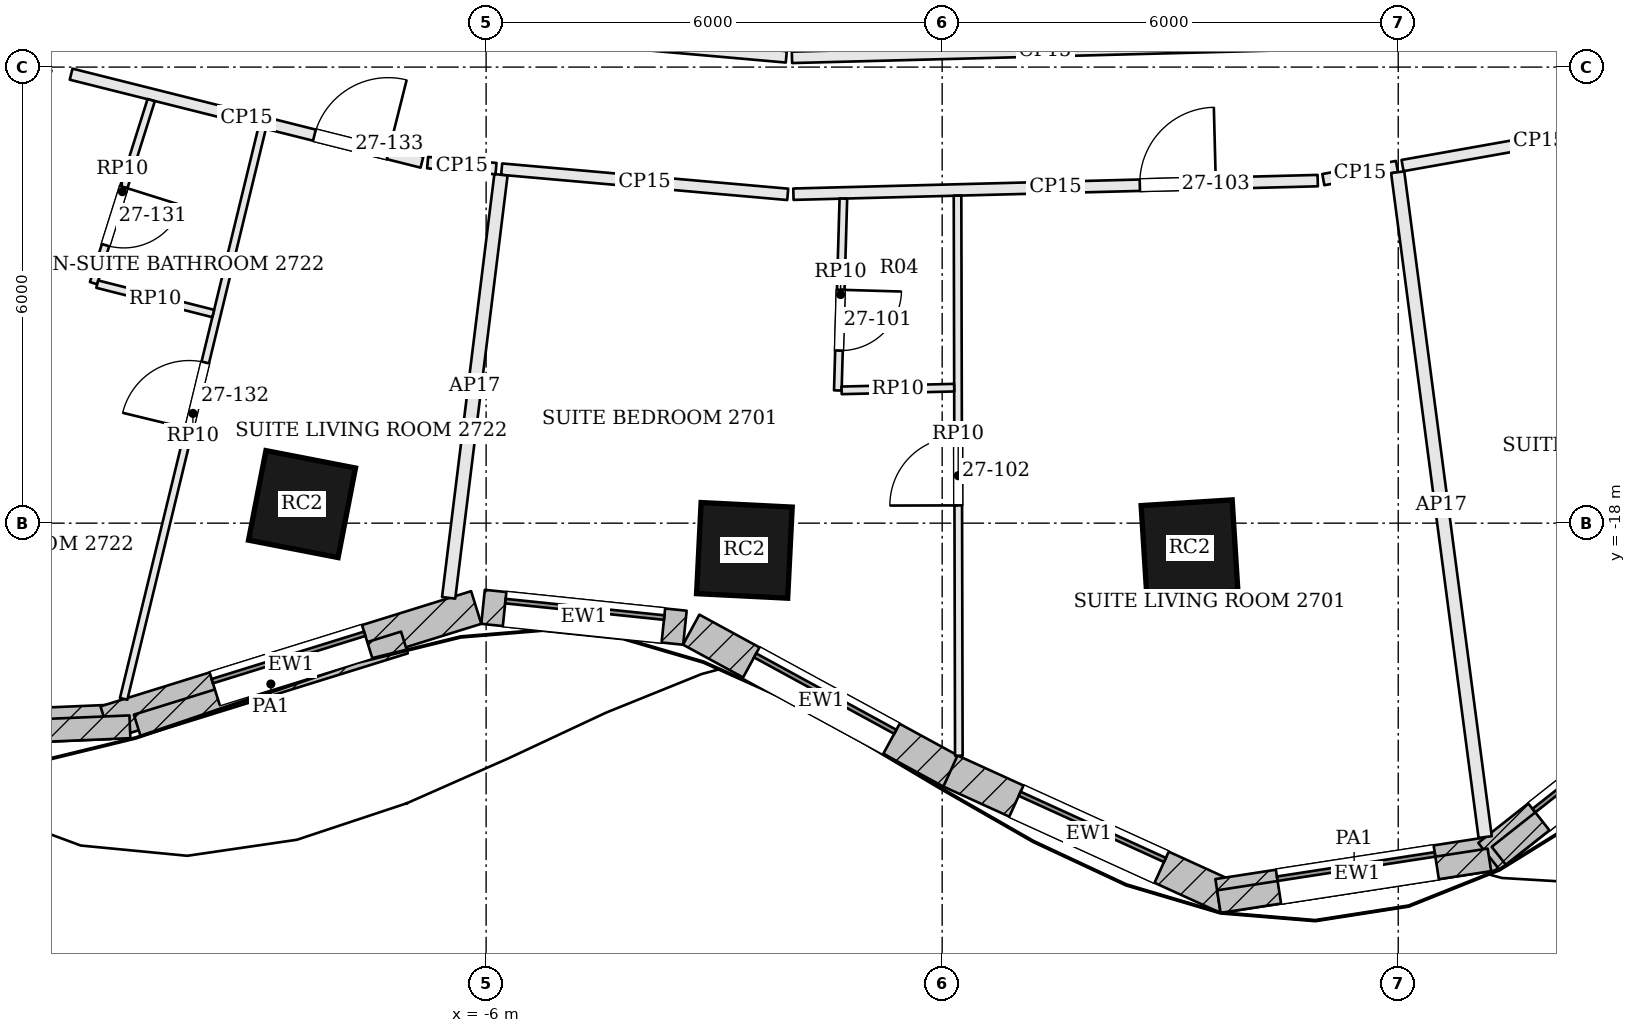
"""IFC4 building model, lengths in metres.
Left out: names, types, materials, properties, quantities, classifications, styles, units other than length and angle.
Written with IfcOpenShell. Run it as: python <this file> out.ifc"""

import sys

from ifc_helpers import new_model, si_unit, direction, frame, frame_2d, origin, origin_2d, place, context, subcontext, project, spatial, rectangle, extrude, element, fill, save


model = new_model("IFC4")
c1 = context("Model", 3, precision=1e-05, world=origin(), true_north=direction((0.0, 1.0)))
c2 = subcontext(c1, "Body", "Model", "MODEL_VIEW")
j1 = project(units=[si_unit("LENGTHUNIT", "METRE"), si_unit("PLANEANGLEUNIT", "RADIAN")], contexts=[c1])
p1 = place(None, origin())
s1 = spatial("IfcSite", under=j1, at=p1, CompositionType="ELEMENT")
p2 = place(p1, origin())
s2 = spatial("IfcBuilding", under=s1, at=p2, CompositionType="ELEMENT")
p3 = place(p2, frame((0.0, 0.0, 114.0)))
s3 = spatial("IfcBuildingStorey", under=s2, at=p3, CompositionType="ELEMENT", Elevation=114.0)
for number, where, z_axis, x_axis in (
    (1, (-8.422, -17.749, 0.0), (0.0, 0.0, 1.0), (0.982, -0.191, 0.0)),
    (2, (-2.602, -18.358, 0.0), (0.0, 0.0, 1.0), (0.999, -0.05, 0.0)),
    (3, (3.254, -18.33, 0.0), (0.0, 0.0, 1.0), (0.998, 0.063, 0.0)),
):
    element("IfcColumn", number, at=place(p3, frame(where, z_axis=z_axis, x_axis=x_axis)), inside=s3, PredefinedType="COLUMN", context=c2, shape_type="SweptSolid", body=[
        extrude(rectangle(XDim=1.2, YDim=1.2, at=origin_2d()), origin(), (0.0, 0.0, 1.0), 3.6),
    ])
p4 = place(p3, frame((-15.283, -20.798, 0.0), z_axis=(0.0, 0.0, 1.0), x_axis=(0.999108814386, 0.042208731526, 0.0)))
e4 = element("IfcWall", 4, at=p4, inside=s3, PredefinedType="SOLIDWALL", context=c2, shape_type="SweptSolid", body=[
    extrude(rectangle(XDim=4.338, YDim=0.45, at=frame_2d((2.169, 0.0))), origin(), (0.0, 0.0, 1.0), 3.4),
])
p5 = place(p4, frame((1.119, 0.0, 0.9)))
e5 = element("IfcOpeningElement", 5, at=p5, cuts=e4, PredefinedType="OPENING", context=c2, shape_type="SweptSolid", body=[
    extrude(rectangle(XDim=2.1, YDim=2.0, at=frame_2d((1.05, 1.0))), frame((0.0, 0.235, 0.0), z_axis=(0.0, -1.0, 0.0), x_axis=(1.0, 0.0, 0.0)), (0.0, 0.0, 1.0), 0.47),
])
p6 = place(p3, frame((-11.007, -20.625, 0.0), z_axis=(0.0, 0.0, 1.0), x_axis=(0.954949254112, 0.296769139352, 0.0)))
e6 = element("IfcWall", 6, at=p6, inside=s3, PredefinedType="SOLIDWALL", context=c2, shape_type="SweptSolid", body=[
    extrude(rectangle(XDim=5.106, YDim=0.45, at=frame_2d((2.553, 0.0))), origin(), (0.0, 0.0, 1.0), 3.4),
])
p7 = place(p6, frame((1.503, 0.0, 0.9)))
e7 = element("IfcOpeningElement", 7, at=p7, cuts=e6, PredefinedType="OPENING", context=c2, shape_type="SweptSolid", body=[
    extrude(rectangle(XDim=2.1, YDim=2.0, at=frame_2d((1.05, 1.0))), frame((0.0, 0.235, 0.0), z_axis=(0.0, -1.0, 0.0), x_axis=(1.0, 0.0, 0.0)), (0.0, 0.0, 1.0), 0.47),
])
p8 = place(p3, frame((-6.04, -19.101, 0.0), z_axis=(0.0, 0.0, 1.0), x_axis=(0.994675968472, -0.103052014752, 0.0)))
e8 = element("IfcWall", 8, at=p8, inside=s3, PredefinedType="SOLIDWALL", context=c2, shape_type="SweptSolid", body=[
    extrude(rectangle(XDim=2.67, YDim=0.45, at=frame_2d((1.335, 0.0))), origin(), (0.0, 0.0, 1.0), 3.4),
])
p9 = place(p8, frame((0.285, 0.0, 0.9)))
e9 = element("IfcOpeningElement", 9, at=p9, cuts=e8, PredefinedType="OPENING", context=c2, shape_type="SweptSolid", body=[
    extrude(rectangle(XDim=2.1, YDim=2.0, at=frame_2d((1.05, 1.0))), frame((0.0, 0.235, 0.0), z_axis=(0.0, -1.0, 0.0), x_axis=(1.0, 0.0, 0.0)), (0.0, 0.0, 1.0), 0.47),
])
p10 = place(p3, frame((-3.302, -19.401, 0.0), z_axis=(0.0, 0.0, 1.0), x_axis=(0.878060540763, -0.47854956562, 0.0)))
e10 = element("IfcWall", 10, at=p10, inside=s3, PredefinedType="SOLIDWALL", context=c2, shape_type="SweptSolid", body=[
    extrude(rectangle(XDim=3.901, YDim=0.45, at=frame_2d((1.951, 0.0))), origin(), (0.0, 0.0, 1.0), 3.4),
])
p11 = place(p10, frame((0.901, 0.0, 0.9)))
e11 = element("IfcOpeningElement", 11, at=p11, cuts=e10, PredefinedType="OPENING", context=c2, shape_type="SweptSolid", body=[
    extrude(rectangle(XDim=2.1, YDim=2.0, at=frame_2d((1.05, 1.0))), frame((0.0, 0.235, 0.0), z_axis=(0.0, -1.0, 0.0), x_axis=(1.0, 0.0, 0.0)), (0.0, 0.0, 1.0), 0.47),
])
p12 = place(p3, frame((0.109, -21.261, 0.0), z_axis=(0.0, 0.0, 1.0), x_axis=(0.910040573706, -0.414519184367, 0.0)))
e12 = element("IfcWall", 12, at=p12, inside=s3, PredefinedType="SOLIDWALL", context=c2, shape_type="SweptSolid", body=[
    extrude(rectangle(XDim=4.006, YDim=0.45, at=frame_2d((2.003, 0.0))), origin(), (0.0, 0.0, 1.0), 3.4),
])
p13 = place(p12, frame((0.953, 0.0, 0.9)))
e13 = element("IfcOpeningElement", 13, at=p13, cuts=e12, PredefinedType="OPENING", context=c2, shape_type="SweptSolid", body=[
    extrude(rectangle(XDim=2.1, YDim=2.0, at=frame_2d((1.05, 1.0))), frame((0.0, 0.235, 0.0), z_axis=(0.0, -1.0, 0.0), x_axis=(1.0, 0.0, 0.0)), (0.0, 0.0, 1.0), 0.47),
])
p14 = place(p3, frame((3.629, -22.905, 0.0), z_axis=(0.0, 0.0, 1.0), x_axis=(0.988300084321, 0.152521943772, 0.0)))
e14 = element("IfcWall", 14, at=p14, inside=s3, PredefinedType="SOLIDWALL", context=c2, shape_type="SweptSolid", body=[
    extrude(rectangle(XDim=3.71, YDim=0.45, at=frame_2d((1.855, 0.0))), origin(), (0.0, 0.0, 1.0), 3.4),
])
p15 = place(p14, frame((0.805, 0.0, 0.9)))
e15 = element("IfcOpeningElement", 15, at=p15, cuts=e14, PredefinedType="OPENING", context=c2, shape_type="SweptSolid", body=[
    extrude(rectangle(XDim=2.1, YDim=2.0, at=frame_2d((1.05, 1.0))), frame((0.0, 0.235, 0.0), z_axis=(0.0, -1.0, 0.0), x_axis=(1.0, 0.0, 0.0)), (0.0, 0.0, 1.0), 0.47),
])
p16 = place(p3, frame((7.193, -22.383, 0.0), z_axis=(0.0, 0.0, 1.0), x_axis=(0.784803291184, 0.619744942816, 0.0)))
e16 = element("IfcWall", 16, at=p16, inside=s3, PredefinedType="SOLIDWALL", context=c2, shape_type="SweptSolid", body=[
    extrude(rectangle(XDim=3.775, YDim=0.45, at=frame_2d((1.887, 0.0))), origin(), (0.0, 0.0, 1.0), 3.4),
])
p17 = place(p16, frame((0.837, 0.0, 0.9)))
e17 = element("IfcOpeningElement", 17, at=p17, cuts=e16, PredefinedType="OPENING", context=c2, shape_type="SweptSolid", body=[
    extrude(rectangle(XDim=2.1, YDim=2.0, at=frame_2d((1.05, 1.0))), frame((0.0, 0.235, 0.0), z_axis=(0.0, -1.0, 0.0), x_axis=(1.0, 0.0, 0.0)), (0.0, 0.0, 1.0), 0.47),
])
p18 = place(p3, frame((-15.133, -20.867, 3.6), z_axis=(0.0, 0.0, 1.0), x_axis=(0.999109914186, 0.042182690458, 0.0)))
e18 = element("IfcWall", 18, at=p18, inside=s3, PredefinedType="PARAPET", context=c2, shape_type="SweptSolid", body=[
    extrude(rectangle(XDim=4.451, YDim=0.3, at=frame_2d((2.225, 0.0))), origin(), (0.0, 0.0, 1.0), 1.1),
])
p19 = place(p3, frame((-10.59, -20.662, 3.6), z_axis=(0.0, 0.0, 1.0), x_axis=(0.954933257017, 0.296820610207, 0.0)))
e19 = element("IfcWall", 19, at=p19, inside=s3, PredefinedType="PARAPET", context=c2, shape_type="SweptSolid", body=[
    extrude(rectangle(XDim=3.681, YDim=0.3, at=frame_2d((1.84, 0.0))), origin(), (0.0, 0.0, 1.0), 1.1),
])
p20 = place(p3, frame((3.64, -22.979, 3.6), z_axis=(0.0, 0.0, 1.0), x_axis=(0.988299486994, 0.152525814235, 0.0)))
e20 = element("IfcWall", 20, at=p20, inside=s3, PredefinedType="PARAPET", context=c2, shape_type="SweptSolid", body=[
    extrude(rectangle(XDim=3.602, YDim=0.3, at=frame_2d((1.801, 0.0))), origin(), (0.0, 0.0, 1.0), 1.1),
])
p21 = place(p3, frame((7.323, -22.376, 3.6), z_axis=(0.0, 0.0, 1.0), x_axis=(0.784819122577, 0.61972489448, 0.0)))
e21 = element("IfcWall", 21, at=p21, inside=s3, PredefinedType="PARAPET", context=c2, shape_type="SweptSolid", body=[
    extrude(rectangle(XDim=3.633, YDim=0.3, at=frame_2d((1.817, 0.0))), origin(), (0.0, 0.0, 1.0), 1.1),
])
p22 = place(p3, frame((-5.795, -13.343, 0.0), z_axis=(0.0, 0.0, 1.0), x_axis=(0.996141988263, -0.087756134937, 0.0)))
e22 = element("IfcWall", 22, at=p22, inside=s3, PredefinedType="PARTITIONING", context=c2, shape_type="SweptSolid", body=[
    extrude(rectangle(XDim=3.778, YDim=0.15, at=frame_2d((1.889, 0.0))), origin(), (0.0, 0.0, 1.0), 2.784),
])
p23 = place(p3, frame((-1.957, -13.672, 0.0), z_axis=(0.0, 0.0, 1.0), x_axis=(0.99966456087, 0.025899145557, 0.0)))
e23 = element("IfcWall", 23, at=p23, inside=s3, PredefinedType="PARTITIONING", context=c2, shape_type="SweptSolid", body=[
    extrude(rectangle(XDim=6.9, YDim=0.15, at=frame_2d((3.45, 0.0))), origin(), (0.0, 0.0, 1.0), 2.784),
])
p24 = place(p23, frame((4.559, 0.0, 0.0)))
e24 = element("IfcOpeningElement", 24, at=p24, cuts=e23, PredefinedType="OPENING", context=c2, shape_type="SweptSolid", body=[
    extrude(rectangle(XDim=1.0, YDim=2.1, at=frame_2d((0.5, 1.05))), frame((0.0, 0.085, 0.0), z_axis=(0.0, -1.0, 0.0), x_axis=(1.0, 0.0, 0.0)), (0.0, 0.0, 1.0), 0.17),
])
p25 = place(p3, frame((5.015, -13.48, 0.0), z_axis=(0.0, 0.0, 1.0), x_axis=(0.984650804906, 0.174535934405, 0.0)))
e25 = element("IfcWall", 25, at=p25, inside=s3, PredefinedType="PARTITIONING", context=c2, shape_type="SweptSolid", body=[
    extrude(rectangle(XDim=0.983, YDim=0.15, at=frame_2d((0.492, 0.0))), origin(), (0.0, 0.0, 1.0), 2.784),
])
p26 = place(p3, frame((-6.493, -18.982, 0.0), z_axis=(0.0, 0.0, 1.0), x_axis=(0.122812974154, 0.992429832975, 0.0)))
e26 = element("IfcWall", 26, at=p26, inside=s3, PredefinedType="PARTITIONING", context=c2, shape_type="SweptSolid", body=[
    extrude(rectangle(XDim=5.608, YDim=0.175, at=frame_2d((2.804, 0.0))), origin(), (0.0, 0.0, 1.0), 2.784),
])
p27 = place(p3, frame((7.144, -22.13, 0.0), z_axis=(0.0, 0.0, 1.0), x_axis=(-0.13045236501, 0.991454578114, 0.0)))
e27 = element("IfcWall", 27, at=p27, inside=s3, PredefinedType="PARTITIONING", context=c2, shape_type="SweptSolid", body=[
    extrude(rectangle(XDim=8.822, YDim=0.175, at=frame_2d((4.411, 0.0))), origin(), (0.0, 0.0, 1.0), 2.784),
])
p28 = place(p3, frame((6.057, -13.295, 0.0), z_axis=(0.0, 0.0, 1.0), x_axis=(0.984639377301, 0.174600391377, 0.0)))
e28 = element("IfcWall", 28, at=p28, inside=s3, PredefinedType="PARTITIONING", context=c2, shape_type="SweptSolid", body=[
    extrude(rectangle(XDim=3.656, YDim=0.15, at=frame_2d((1.828, 0.0))), origin(), (0.0, 0.0, 1.0), 2.784),
])
p29 = place(p3, frame((-11.46, -12.093, 0.0), z_axis=(0.0, 0.0, 1.0), x_axis=(0.969988379079, -0.243151278945, 0.0)))
e29 = element("IfcWall", 29, at=p29, inside=s3, PredefinedType="PARTITIONING", context=c2, shape_type="SweptSolid", body=[
    extrude(rectangle(XDim=4.758, YDim=0.15, at=frame_2d((2.379, 0.0))), origin(), (0.0, 0.0, 1.0), 2.784),
])
p30 = place(p29, frame((3.3, 0.0, 0.0)))
e30 = element("IfcOpeningElement", 30, at=p30, cuts=e29, PredefinedType="OPENING", context=c2, shape_type="SweptSolid", body=[
    extrude(rectangle(XDim=1.0, YDim=2.1, at=frame_2d((0.5, 1.05))), frame((0.0, 0.085, 0.0), z_axis=(0.0, -1.0, 0.0), x_axis=(1.0, 0.0, 0.0)), (0.0, 0.0, 1.0), 0.17),
])
p31 = place(p3, frame((-6.77, -13.257, 0.0), z_axis=(0.0, 0.0, 1.0), x_axis=(0.996131242487, -0.087878027635, 0.0)))
e31 = element("IfcWall", 31, at=p31, inside=s3, PredefinedType="PARTITIONING", context=c2, shape_type="SweptSolid", body=[
    extrude(rectangle(XDim=0.903, YDim=0.15, at=frame_2d((0.451, 0.0))), origin(), (0.0, 0.0, 1.0), 2.784),
])
p32 = place(p3, frame((4.684, -11.699, 0.0), z_axis=(0.0, 0.0, 1.0), x_axis=(-0.999663438204, -0.025942442425, 0.0)))
e32 = element("IfcWall", 32, at=p32, inside=s3, PredefinedType="PARTITIONING", context=c2, shape_type="SweptSolid", body=[
    extrude(rectangle(XDim=6.663, YDim=0.15, at=frame_2d((3.332, 0.0))), origin(), (0.0, 0.0, 1.0), 2.784),
])
p33 = place(p3, frame((-2.051, -11.865, 0.0), z_axis=(0.0, 0.0, 1.0), x_axis=(-0.996139599493, 0.087783246245, 0.0)))
e33 = element("IfcWall", 33, at=p33, inside=s3, PredefinedType="PARTITIONING", context=c2, shape_type="SweptSolid", body=[
    extrude(rectangle(XDim=4.511, YDim=0.15, at=frame_2d((2.255, 0.0))), origin(), (0.0, 0.0, 1.0), 2.784),
])
p34 = place(p3, frame((0.219, -21.059, 0.0), z_axis=(0.0, 0.0, 1.0), x_axis=(-0.002352544848, 0.999997232763, 0.0)))
e34 = element("IfcWall", 34, at=p34, inside=s3, PredefinedType="PARTITIONING", context=c2, shape_type="SweptSolid", body=[
    extrude(rectangle(XDim=7.368, YDim=0.1, at=frame_2d((3.684, 0.0))), origin(), (0.0, 0.0, 1.0), 2.884),
])
p35 = place(p34, frame((3.293, 0.0, 0.0)))
e35 = element("IfcOpeningElement", 35, at=p35, cuts=e34, PredefinedType="OPENING", context=c2, shape_type="SweptSolid", body=[
    extrude(rectangle(XDim=0.9, YDim=2.4, at=frame_2d((0.45, 1.2))), frame((0.0, 0.06, 0.0), z_axis=(0.0, -1.0, 0.0), x_axis=(1.0, 0.0, 0.0)), (0.0, 0.0, 1.0), 0.12),
])
p36 = place(p3, frame((-1.3, -13.73, 0.0), z_axis=(0.0, 0.0, 1.0), x_axis=(-0.028910332819, -0.99958200897, 0.0)))
e36 = element("IfcWall", 36, at=p36, inside=s3, PredefinedType="PARTITIONING", context=c2, shape_type="SweptSolid", body=[
    extrude(rectangle(XDim=2.525, YDim=0.1, at=frame_2d((1.262, 0.0))), origin(), (0.0, 0.0, 1.0), 2.884),
])
p37 = place(p36, frame((1.2, 0.0, 0.0)))
e37 = element("IfcOpeningElement", 37, at=p37, cuts=e36, PredefinedType="OPENING", context=c2, shape_type="SweptSolid", body=[
    extrude(rectangle(XDim=0.8, YDim=2.1, at=frame_2d((0.4, 1.05))), frame((0.0, 0.06, 0.0), z_axis=(0.0, -1.0, 0.0), x_axis=(1.0, 0.0, 0.0)), (0.0, 0.0, 1.0), 0.12),
])
p38 = place(p3, frame((-1.323, -16.253, 0.0), z_axis=(0.0, 0.0, 1.0), x_axis=(0.999714428323, 0.023896899457, 0.0)))
e38 = element("IfcWall", 38, at=p38, inside=s3, PredefinedType="PARTITIONING", context=c2, shape_type="SweptSolid", body=[
    extrude(rectangle(XDim=1.481, YDim=0.1, at=frame_2d((0.741, 0.0))), origin(), (0.0, 0.0, 1.0), 2.884),
])
p39 = place(p3, frame((-10.769, -20.311, 0.0), z_axis=(0.0, 0.0, 1.0), x_axis=(0.235780843646, 0.971806253206, 0.0)))
e39 = element("IfcWall", 39, at=p39, inside=s3, PredefinedType="PARTITIONING", context=c2, shape_type="SweptSolid", body=[
    extrude(rectangle(XDim=7.729, YDim=0.1, at=frame_2d((3.864, 0.0))), origin(), (0.0, 0.0, 1.0), 2.884),
])
p40 = place(p39, frame((3.654, 0.0, 0.0)))
e40 = element("IfcOpeningElement", 40, at=p40, cuts=e39, PredefinedType="OPENING", context=c2, shape_type="SweptSolid", body=[
    extrude(rectangle(XDim=0.9, YDim=2.4, at=frame_2d((0.45, 1.2))), frame((0.0, 0.06, 0.0), z_axis=(0.0, -1.0, 0.0), x_axis=(1.0, 0.0, 0.0)), (0.0, 0.0, 1.0), 0.12),
])
p41 = place(p3, frame((-10.406, -12.434, 0.0), z_axis=(0.0, 0.0, 1.0), x_axis=(-0.300404792704, -0.95381180561, 0.0)))
e41 = element("IfcWall", 41, at=p41, inside=s3, PredefinedType="PARTITIONING", context=c2, shape_type="SweptSolid", body=[
    extrude(rectangle(XDim=2.525, YDim=0.1, at=frame_2d((1.263, 0.0))), origin(), (0.0, 0.0, 1.0), 2.884),
])
p42 = place(p41, frame((1.2, 0.0, 0.0)))
e42 = element("IfcOpeningElement", 42, at=p42, cuts=e41, PredefinedType="OPENING", context=c2, shape_type="SweptSolid", body=[
    extrude(rectangle(XDim=0.8, YDim=2.1, at=frame_2d((0.4, 1.05))), frame((0.0, 0.06, 0.0), z_axis=(0.0, -1.0, 0.0), x_axis=(1.0, 0.0, 0.0)), (0.0, 0.0, 1.0), 0.12),
])
p43 = place(p3, frame((-11.116, -14.855, 0.0), z_axis=(0.0, 0.0, 1.0), x_axis=(0.969315873367, -0.245818505486, 0.0)))
e43 = element("IfcWall", 43, at=p43, inside=s3, PredefinedType="PARTITIONING", context=c2, shape_type="SweptSolid", body=[
    extrude(rectangle(XDim=1.574, YDim=0.1, at=frame_2d((0.787, 0.0))), origin(), (0.0, 0.0, 1.0), 2.884),
])
p44 = place(p7, origin())
e44 = element("IfcWindow", 44, at=p44, inside=s3, PartitioningType="SINGLE_PANEL", PredefinedType="WINDOW", context=c2, shape_type="SweptSolid", body=[
    extrude(rectangle(XDim=2.1, YDim=2.0, at=frame_2d((1.05, 1.0))), frame((0.0, 0.135, 0.0), z_axis=(0.0, -1.0, 0.0), x_axis=(1.0, 0.0, 0.0)), (0.0, 0.0, 1.0), 0.06),
])
fill(e7, e44)
p45 = place(p9, origin())
e45 = element("IfcWindow", 45, at=p45, inside=s3, PartitioningType="SINGLE_PANEL", PredefinedType="WINDOW", context=c2, shape_type="SweptSolid", body=[
    extrude(rectangle(XDim=2.1, YDim=2.0, at=frame_2d((1.05, 1.0))), frame((0.0, 0.135, 0.0), z_axis=(0.0, -1.0, 0.0), x_axis=(1.0, 0.0, 0.0)), (0.0, 0.0, 1.0), 0.06),
])
fill(e9, e45)
p46 = place(p11, origin())
e46 = element("IfcWindow", 46, at=p46, inside=s3, PartitioningType="SINGLE_PANEL", PredefinedType="WINDOW", context=c2, shape_type="SweptSolid", body=[
    extrude(rectangle(XDim=2.1, YDim=2.0, at=frame_2d((1.05, 1.0))), frame((0.0, 0.135, 0.0), z_axis=(0.0, -1.0, 0.0), x_axis=(1.0, 0.0, 0.0)), (0.0, 0.0, 1.0), 0.06),
])
fill(e11, e46)
p47 = place(p13, origin())
e47 = element("IfcWindow", 47, at=p47, inside=s3, PartitioningType="SINGLE_PANEL", PredefinedType="WINDOW", context=c2, shape_type="SweptSolid", body=[
    extrude(rectangle(XDim=2.1, YDim=2.0, at=frame_2d((1.05, 1.0))), frame((0.0, 0.135, 0.0), z_axis=(0.0, -1.0, 0.0), x_axis=(1.0, 0.0, 0.0)), (0.0, 0.0, 1.0), 0.06),
])
fill(e13, e47)
p48 = place(p15, origin())
e48 = element("IfcWindow", 48, at=p48, inside=s3, PartitioningType="SINGLE_PANEL", PredefinedType="WINDOW", context=c2, shape_type="SweptSolid", body=[
    extrude(rectangle(XDim=2.1, YDim=2.0, at=frame_2d((1.05, 1.0))), frame((0.0, 0.135, 0.0), z_axis=(0.0, -1.0, 0.0), x_axis=(1.0, 0.0, 0.0)), (0.0, 0.0, 1.0), 0.06),
])
fill(e15, e48)
p49 = place(p17, origin())
e49 = element("IfcWindow", 49, at=p49, inside=s3, PartitioningType="SINGLE_PANEL", PredefinedType="WINDOW", context=c2, shape_type="SweptSolid", body=[
    extrude(rectangle(XDim=2.1, YDim=2.0, at=frame_2d((1.05, 1.0))), frame((0.0, 0.135, 0.0), z_axis=(0.0, -1.0, 0.0), x_axis=(1.0, 0.0, 0.0)), (0.0, 0.0, 1.0), 0.06),
])
fill(e17, e49)
p50 = place(p37, origin())
e50 = element("IfcDoor", 50, at=p50, inside=s3, OperationType="SINGLE_SWING_LEFT", PredefinedType="DOOR", context=c2, shape_type="SweptSolid", body=[
    extrude(rectangle(XDim=0.8, YDim=2.1, at=frame_2d((0.4, 1.05))), frame((0.0, 0.025, 0.0), z_axis=(0.0, -1.0, 0.0), x_axis=(1.0, 0.0, 0.0)), (0.0, 0.0, 1.0), 0.05),
])
fill(e37, e50)
p51 = place(p35, origin())
e51 = element("IfcDoor", 51, at=p51, inside=s3, OperationType="SINGLE_SWING_LEFT", PredefinedType="DOOR", context=c2, shape_type="SweptSolid", body=[
    extrude(rectangle(XDim=0.9, YDim=2.4, at=frame_2d((0.45, 1.2))), frame((0.0, 0.025, 0.0), z_axis=(0.0, -1.0, 0.0), x_axis=(1.0, 0.0, 0.0)), (0.0, 0.0, 1.0), 0.05),
])
fill(e35, e51)
p52 = place(p24, origin())
e52 = element("IfcDoor", 52, at=p52, inside=s3, OperationType="SINGLE_SWING_RIGHT", PredefinedType="DOOR", context=c2, shape_type="SweptSolid", body=[
    extrude(rectangle(XDim=1.0, YDim=2.1, at=frame_2d((0.5, 1.05))), frame((0.0, 0.025, 0.0), z_axis=(0.0, -1.0, 0.0), x_axis=(1.0, 0.0, 0.0)), (0.0, 0.0, 1.0), 0.05),
])
fill(e24, e52)
p53 = place(p42, origin())
e53 = element("IfcDoor", 53, at=p53, inside=s3, OperationType="SINGLE_SWING_LEFT", PredefinedType="DOOR", context=c2, shape_type="SweptSolid", body=[
    extrude(rectangle(XDim=0.8, YDim=2.1, at=frame_2d((0.4, 1.05))), frame((0.0, 0.025, 0.0), z_axis=(0.0, -1.0, 0.0), x_axis=(1.0, 0.0, 0.0)), (0.0, 0.0, 1.0), 0.05),
])
fill(e42, e53)
p54 = place(p40, origin())
e54 = element("IfcDoor", 54, at=p54, inside=s3, OperationType="SINGLE_SWING_LEFT", PredefinedType="DOOR", context=c2, shape_type="SweptSolid", body=[
    extrude(rectangle(XDim=0.9, YDim=2.4, at=frame_2d((0.45, 1.2))), frame((0.0, 0.025, 0.0), z_axis=(0.0, -1.0, 0.0), x_axis=(1.0, 0.0, 0.0)), (0.0, 0.0, 1.0), 0.05),
])
fill(e40, e54)
p55 = place(p30, origin())
e55 = element("IfcDoor", 55, at=p55, inside=s3, OperationType="SINGLE_SWING_RIGHT", PredefinedType="DOOR", context=c2, shape_type="SweptSolid", body=[
    extrude(rectangle(XDim=1.0, YDim=2.1, at=frame_2d((0.5, 1.05))), frame((0.0, 0.025, 0.0), z_axis=(0.0, -1.0, 0.0), x_axis=(1.0, 0.0, 0.0)), (0.0, 0.0, 1.0), 0.05),
])
fill(e30, e55)
save(model, sys.argv[1])
